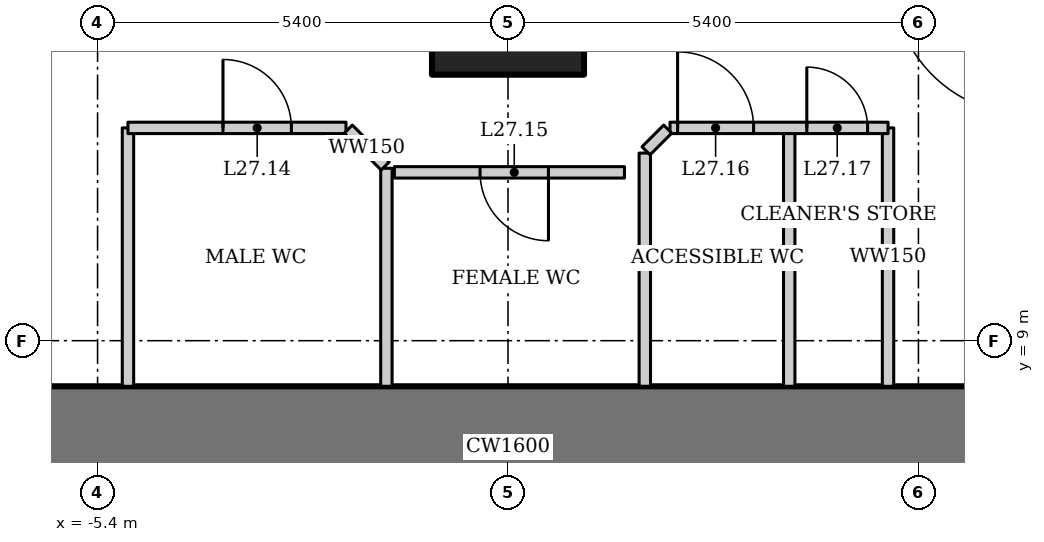
"""IFC4 building model, lengths in metres.
Left out: names, types, materials, properties, quantities, classifications, styles, units other than length and angle.
Written with IfcOpenShell. Run it as: python <this file> out.ifc"""

import sys

from ifc_helpers import new_model, si_unit, direction, frame, frame_2d, origin, origin_2d, place, context, subcontext, project, spatial, rectangle, hollow_rectangle, extrude, element, fill, save


model = new_model("IFC4")
c1 = context("Model", 3, precision=1e-05, world=origin(), true_north=direction((0.0, 1.0)))
c2 = subcontext(c1, "Body", "Model", "MODEL_VIEW")
j1 = project(units=[si_unit("LENGTHUNIT", "METRE"), si_unit("PLANEANGLEUNIT", "RADIAN")], contexts=[c1])
p1 = place(None, origin())
s1 = spatial("IfcSite", under=j1, at=p1, CompositionType="ELEMENT")
p2 = place(p1, origin())
s2 = spatial("IfcBuilding", under=s1, at=p2, CompositionType="ELEMENT")
p3 = place(p2, frame((0.0, 0.0, 117.4)))
s3 = spatial("IfcBuildingStorey", under=s2, at=p3, CompositionType="ELEMENT", Elevation=117.4)
p4 = place(p3, frame((0.0, 13.5, 0.0), z_axis=(0.0, 0.0, 1.0), x_axis=(1.0, 0.0, 0.0)))
e1 = element("IfcColumn", 1, at=p4, inside=s3, PredefinedType="COLUMN", context=c2, shape_type="SweptSolid", body=[
    extrude(hollow_rectangle(XDim=2.0, YDim=2.0, WallThickness=0.17, at=origin_2d()), origin(), (0.0, 0.0, 1.0), 4.2),
])
p5 = place(p3, frame((12.2, 7.6, 0.0), z_axis=(0.0, 0.0, 1.0), x_axis=(-1.0, 0.0, 0.0)))
e2 = element("IfcWall", 2, at=p5, inside=s3, PredefinedType="SHEAR", context=c2, shape_type="SweptSolid", body=[
    extrude(rectangle(XDim=24.4, YDim=1.6, at=frame_2d((12.2, 0.0))), origin(), (0.0, 0.0, 1.0), 4.2),
])
for number, where, z_axis, x_axis in (
    (3, (-5.0, 8.4, 0.0), (0.0, 0.0, 1.0), (0.0, 1.0, 0.0)),
    (4, (5.0, 8.4, 0.0), (0.0, 0.0, 1.0), (0.0, 1.0, 0.0)),
    (5, (3.7, 8.4, 0.0), (0.0, 0.0, 1.0), (0.0, 1.0, 0.0)),
):
    element("IfcWall", number, at=place(p3, frame(where, z_axis=z_axis, x_axis=x_axis)), inside=s3, PredefinedType="SOLIDWALL", context=c2, shape_type="SweptSolid", body=[
        extrude(rectangle(XDim=3.4, YDim=0.15, at=frame_2d((1.7, 0.0))), origin(), (0.0, 0.0, 1.0), 4.05),
    ])
p6 = place(p3, frame((-5.0, 11.8, 0.0), z_axis=(0.0, 0.0, 1.0), x_axis=(1.0, 0.0, 0.0)))
e6 = element("IfcWall", 6, at=p6, inside=s3, PredefinedType="SOLIDWALL", context=c2, shape_type="SweptSolid", body=[
    extrude(rectangle(XDim=2.869, YDim=0.15, at=frame_2d((1.434, 0.0))), origin(), (0.0, 0.0, 1.0), 4.05),
])
p7 = place(p6, frame((1.25, 0.0, 0.0)))
e7 = element("IfcOpeningElement", 7, at=p7, cuts=e6, PredefinedType="OPENING", context=c2, shape_type="SweptSolid", body=[
    extrude(rectangle(XDim=0.9, YDim=2.1, at=frame_2d((0.45, 1.05))), frame((0.0, 0.085, 0.0), z_axis=(0.0, -1.0, 0.0), x_axis=(1.0, 0.0, 0.0)), (0.0, 0.0, 1.0), 0.17),
])
p8 = place(p3, frame((2.131, 11.8, 0.0), z_axis=(0.0, 0.0, 1.0), x_axis=(1.0, 0.0, 0.0)))
e8 = element("IfcWall", 8, at=p8, inside=s3, PredefinedType="SOLIDWALL", context=c2, shape_type="SweptSolid", body=[
    extrude(rectangle(XDim=2.869, YDim=0.15, at=frame_2d((1.434, 0.0))), origin(), (0.0, 0.0, 1.0), 4.05),
])
p9 = place(p8, frame((0.1, 0.0, 0.0)))
e9 = element("IfcOpeningElement", 9, at=p9, cuts=e8, PredefinedType="OPENING", context=c2, shape_type="SweptSolid", body=[
    extrude(rectangle(XDim=1.0, YDim=2.1, at=frame_2d((0.5, 1.05))), frame((0.0, 0.085, 0.0), z_axis=(0.0, -1.0, 0.0), x_axis=(1.0, 0.0, 0.0)), (0.0, 0.0, 1.0), 0.17),
])
p10 = place(p8, frame((1.8, 0.0, 0.0)))
e10 = element("IfcOpeningElement", 10, at=p10, cuts=e8, PredefinedType="OPENING", context=c2, shape_type="SweptSolid", body=[
    extrude(rectangle(XDim=0.8, YDim=2.1, at=frame_2d((0.4, 1.05))), frame((0.0, 0.085, 0.0), z_axis=(0.0, -1.0, 0.0), x_axis=(1.0, 0.0, 0.0)), (0.0, 0.0, 1.0), 0.17),
])
p11 = place(p3, frame((-1.6, 8.4, 0.0), z_axis=(0.0, 0.0, 1.0), x_axis=(0.0, 1.0, 0.0)))
e11 = element("IfcWall", 11, at=p11, inside=s3, PredefinedType="SOLIDWALL", context=c2, shape_type="SweptSolid", body=[
    extrude(rectangle(XDim=2.869, YDim=0.15, at=frame_2d((1.434, 0.0))), origin(), (0.0, 0.0, 1.0), 4.05),
])
p12 = place(p3, frame((1.8, 8.4, 0.0), z_axis=(0.0, 0.0, 1.0), x_axis=(0.0, 1.0, 0.0)))
e12 = element("IfcWall", 12, at=p12, inside=s3, PredefinedType="SOLIDWALL", context=c2, shape_type="SweptSolid", body=[
    extrude(rectangle(XDim=3.069, YDim=0.15, at=frame_2d((1.534, 0.0))), origin(), (0.0, 0.0, 1.0), 4.05),
])
p13 = place(p3, frame((-1.616, 11.299, 0.0), z_axis=(0.0, 0.0, 1.0), x_axis=(-0.706928959799, 0.707284557867, 0.0)))
e13 = element("IfcWall", 13, at=p13, inside=s3, PredefinedType="SOLIDWALL", context=c2, shape_type="SweptSolid", body=[
    extrude(rectangle(XDim=0.687, YDim=0.15, at=frame_2d((0.343, 0.0))), origin(), (0.0, 0.0, 1.0), 4.05),
])
p14 = place(p3, frame((1.532, 11.215, 0.0), z_axis=(0.0, 0.0, 1.0), x_axis=(-1.0, 0.0, 0.0)))
e14 = element("IfcWall", 14, at=p14, inside=s3, PredefinedType="SOLIDWALL", context=c2, shape_type="SweptSolid", body=[
    extrude(rectangle(XDim=3.027, YDim=0.15, at=frame_2d((1.514, 0.0))), origin(), (0.0, 0.0, 1.0), 4.05),
])
p15 = place(p14, frame((1.0, 0.0, 0.0)))
e15 = element("IfcOpeningElement", 15, at=p15, cuts=e14, PredefinedType="OPENING", context=c2, shape_type="SweptSolid", body=[
    extrude(rectangle(XDim=0.9, YDim=2.1, at=frame_2d((0.45, 1.05))), frame((0.0, 0.085, 0.0), z_axis=(0.0, -1.0, 0.0), x_axis=(1.0, 0.0, 0.0)), (0.0, 0.0, 1.0), 0.17),
])
p16 = place(p3, frame((2.101, 11.784, 0.0), z_axis=(0.0, 0.0, 1.0), x_axis=(-0.706804405012, -0.707409028113, 0.0)))
e16 = element("IfcWall", 16, at=p16, inside=s3, PredefinedType="SOLIDWALL", context=c2, shape_type="SweptSolid", body=[
    extrude(rectangle(XDim=0.404, YDim=0.15, at=frame_2d((0.202, 0.0))), origin(), (0.0, 0.0, 1.0), 4.05),
])
p17 = place(p7, origin())
e17 = element("IfcDoor", 17, at=p17, inside=s3, OperationType="SINGLE_SWING_LEFT", PredefinedType="DOOR", context=c2, shape_type="SweptSolid", body=[
    extrude(rectangle(XDim=0.9, YDim=2.1, at=frame_2d((0.45, 1.05))), frame((0.0, 0.025, 0.0), z_axis=(0.0, -1.0, 0.0), x_axis=(1.0, 0.0, 0.0)), (0.0, 0.0, 1.0), 0.05),
])
fill(e7, e17)
p18 = place(p15, origin())
e18 = element("IfcDoor", 18, at=p18, inside=s3, OperationType="SINGLE_SWING_LEFT", PredefinedType="DOOR", context=c2, shape_type="SweptSolid", body=[
    extrude(rectangle(XDim=0.9, YDim=2.1, at=frame_2d((0.45, 1.05))), frame((0.0, 0.025, 0.0), z_axis=(0.0, -1.0, 0.0), x_axis=(1.0, 0.0, 0.0)), (0.0, 0.0, 1.0), 0.05),
])
fill(e15, e18)
p19 = place(p9, origin())
e19 = element("IfcDoor", 19, at=p19, inside=s3, OperationType="SINGLE_SWING_LEFT", PredefinedType="DOOR", context=c2, shape_type="SweptSolid", body=[
    extrude(rectangle(XDim=1.0, YDim=2.1, at=frame_2d((0.5, 1.05))), frame((0.0, 0.025, 0.0), z_axis=(0.0, -1.0, 0.0), x_axis=(1.0, 0.0, 0.0)), (0.0, 0.0, 1.0), 0.05),
])
fill(e9, e19)
p20 = place(p10, origin())
e20 = element("IfcDoor", 20, at=p20, inside=s3, OperationType="SINGLE_SWING_LEFT", PredefinedType="DOOR", context=c2, shape_type="SweptSolid", body=[
    extrude(rectangle(XDim=0.8, YDim=2.1, at=frame_2d((0.4, 1.05))), frame((0.0, 0.025, 0.0), z_axis=(0.0, -1.0, 0.0), x_axis=(1.0, 0.0, 0.0)), (0.0, 0.0, 1.0), 0.05),
])
fill(e10, e20)
save(model, sys.argv[1])
